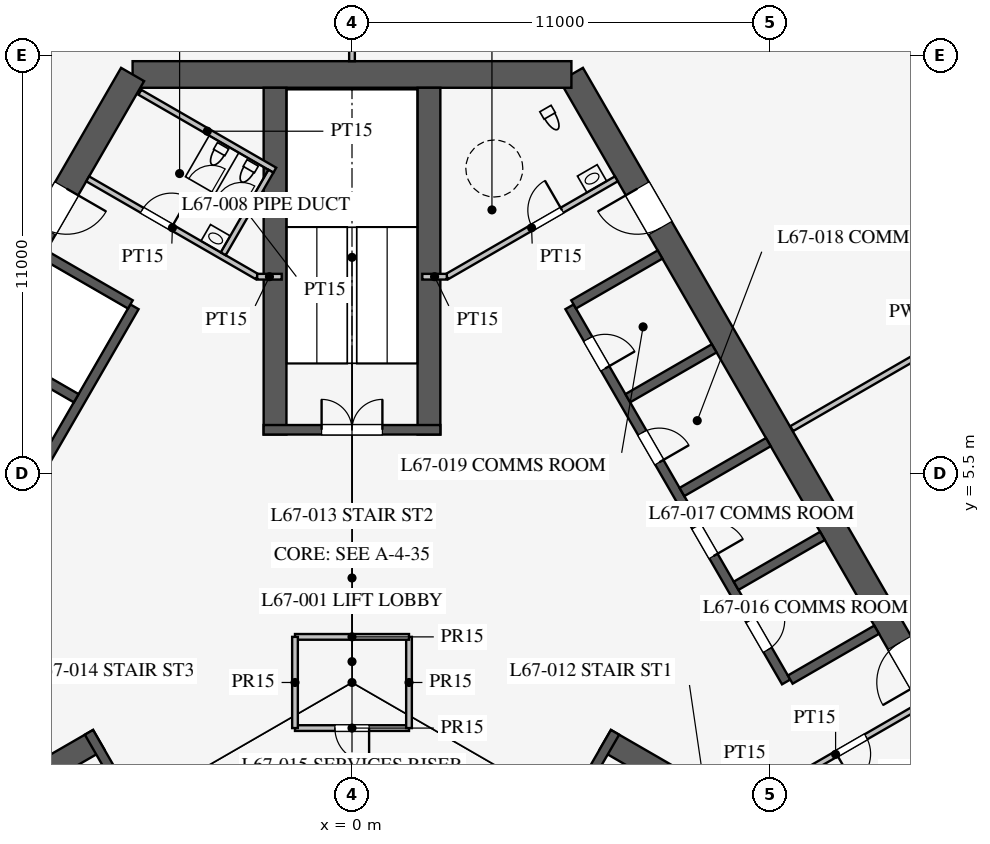
"""IFC4 building model, lengths in metres.
Left out: names, types, materials, properties, quantities, classifications, styles, units other than length and angle.
Written with IfcOpenShell. Run it as: python <this file> out.ifc"""

import sys

from ifc_helpers import new_model, si_unit, direction, frame, frame_2d, origin, place, context, subcontext, project, spatial, rectangle, extrude, element, fill, save


model = new_model("IFC4")
c1 = context("Model", 3, precision=1e-05, world=origin(), true_north=direction((0.0, 1.0)))
c2 = subcontext(c1, "Body", "Model", "MODEL_VIEW")
j1 = project(units=[si_unit("LENGTHUNIT", "METRE"), si_unit("PLANEANGLEUNIT", "RADIAN")], contexts=[c1])
p1 = place(None, origin())
s1 = spatial("IfcSite", under=j1, at=p1, CompositionType="ELEMENT")
p2 = place(p1, origin())
s2 = spatial("IfcBuilding", under=s1, at=p2, CompositionType="ELEMENT")
p3 = place(p2, frame((0.0, 0.0, 293.1)))
s3 = spatial("IfcBuildingStorey", under=s2, at=p3, CompositionType="ELEMENT", Elevation=293.1)
p4 = place(p3, frame((16.743, -3.0, 0.0), z_axis=(0.0, 0.0, 1.0), x_axis=(-0.500002442456, 0.866023993627, 0.0)))
e1 = element("IfcWall", 1, at=p4, inside=s3, PredefinedType="SHEAR", context=c2, shape_type="SweptSolid", body=[
    extrude(rectangle(XDim=21.939, YDim=0.7, at=frame_2d((10.97, 0.0))), origin(), (0.0, 0.0, 1.0), 4.2),
])
p5 = place(p4, frame((17.27, 0.0, 0.0)))
e2 = element("IfcOpeningElement", 2, at=p5, cuts=e1, PredefinedType="OPENING", context=c2, shape_type="SweptSolid", body=[
    extrude(rectangle(XDim=1.2, YDim=2.1, at=frame_2d((0.6, 1.05))), frame((0.0, 0.36, 0.0), z_axis=(0.0, -1.0, 0.0), x_axis=(1.0, 0.0, 0.0)), (0.0, 0.0, 1.0), 0.72),
])
p6 = place(p4, frame((3.47, 0.0, 0.0)))
e3 = element("IfcOpeningElement", 3, at=p6, cuts=e1, PredefinedType="OPENING", context=c2, shape_type="SweptSolid", body=[
    extrude(rectangle(XDim=1.2, YDim=2.1, at=frame_2d((0.6, 1.05))), frame((0.0, 0.36, 0.0), z_axis=(0.0, -1.0, 0.0), x_axis=(1.0, 0.0, 0.0)), (0.0, 0.0, 1.0), 0.72),
])
p7 = place(p3, frame((5.773, 16.0, 0.0), z_axis=(0.0, 0.0, 1.0), x_axis=(-1.0, 0.0, 0.0)))
e4 = element("IfcWall", 4, at=p7, inside=s3, PredefinedType="SHEAR", context=c2, shape_type="SweptSolid", body=[
    extrude(rectangle(XDim=11.547, YDim=0.7, at=frame_2d((5.773, 0.0))), origin(), (0.0, 0.0, 1.0), 4.2),
])
p8 = place(p3, frame((-5.773, 16.0, 0.0), z_axis=(0.0, 0.0, 1.0), x_axis=(-0.500002442456, -0.866023993627, 0.0)))
e5 = element("IfcWall", 5, at=p8, inside=s3, PredefinedType="SHEAR", context=c2, shape_type="SweptSolid", body=[
    extrude(rectangle(XDim=21.939, YDim=0.7, at=frame_2d((10.97, 0.0))), origin(), (0.0, 0.0, 1.0), 4.2),
])
p9 = place(p8, frame((17.27, 0.0, 0.0)))
e6 = element("IfcOpeningElement", 6, at=p9, cuts=e5, PredefinedType="OPENING", context=c2, shape_type="SweptSolid", body=[
    extrude(rectangle(XDim=1.2, YDim=2.1, at=frame_2d((0.6, 1.05))), frame((0.0, 0.36, 0.0), z_axis=(0.0, -1.0, 0.0), x_axis=(1.0, 0.0, 0.0)), (0.0, 0.0, 1.0), 0.72),
])
p10 = place(p8, frame((3.47, 0.0, 0.0)))
e7 = element("IfcOpeningElement", 7, at=p10, cuts=e5, PredefinedType="OPENING", context=c2, shape_type="SweptSolid", body=[
    extrude(rectangle(XDim=1.2, YDim=2.1, at=frame_2d((0.6, 1.05))), frame((0.0, 0.36, 0.0), z_axis=(0.0, -1.0, 0.0), x_axis=(1.0, 0.0, 0.0)), (0.0, 0.0, 1.0), 0.72),
])
p11 = place(p3, frame((11.424, 0.014, 0.0), z_axis=(0.0, 0.0, 1.0), x_axis=(-0.500001763848, 0.866024385424, 0.0)))
e8 = element("IfcWall", 8, at=p11, inside=s3, PredefinedType="SHEAR", context=c2, shape_type="SweptSolid", body=[
    extrude(rectangle(XDim=11.4, YDim=0.25, at=frame_2d((5.7, 0.0))), origin(), (0.0, 0.0, 1.0), 4.2),
])
p12 = place(p11, frame((0.975, 0.0, 0.0)))
e9 = element("IfcOpeningElement", 9, at=p12, cuts=e8, PredefinedType="OPENING", context=c2, shape_type="SweptSolid", body=[
    extrude(rectangle(XDim=0.9, YDim=2.1, at=frame_2d((0.45, 1.05))), frame((0.0, 0.135, 0.0), z_axis=(0.0, -1.0, 0.0), x_axis=(1.0, 0.0, 0.0)), (0.0, 0.0, 1.0), 0.27),
])
p13 = place(p11, frame((3.825, 0.0, 0.0)))
e10 = element("IfcOpeningElement", 10, at=p13, cuts=e8, PredefinedType="OPENING", context=c2, shape_type="SweptSolid", body=[
    extrude(rectangle(XDim=0.9, YDim=2.1, at=frame_2d((0.45, 1.05))), frame((0.0, 0.135, 0.0), z_axis=(0.0, -1.0, 0.0), x_axis=(1.0, 0.0, 0.0)), (0.0, 0.0, 1.0), 0.27),
])
p14 = place(p11, frame((6.675, 0.0, 0.0)))
e11 = element("IfcOpeningElement", 11, at=p14, cuts=e8, PredefinedType="OPENING", context=c2, shape_type="SweptSolid", body=[
    extrude(rectangle(XDim=0.9, YDim=2.1, at=frame_2d((0.45, 1.05))), frame((0.0, 0.135, 0.0), z_axis=(0.0, -1.0, 0.0), x_axis=(1.0, 0.0, 0.0)), (0.0, 0.0, 1.0), 0.27),
])
p15 = place(p11, frame((9.525, 0.0, 0.0)))
e12 = element("IfcOpeningElement", 12, at=p15, cuts=e8, PredefinedType="OPENING", context=c2, shape_type="SweptSolid", body=[
    extrude(rectangle(XDim=0.9, YDim=2.1, at=frame_2d((0.45, 1.05))), frame((0.0, 0.135, 0.0), z_axis=(0.0, -1.0, 0.0), x_axis=(1.0, 0.0, 0.0)), (0.0, 0.0, 1.0), 0.27),
])
for number, where, z_axis, x_axis in (
    (13, (11.532, 0.076, 0.0), (0.0, 0.0, 1.0), (0.866, 0.5, 0.0)),
    (14, (10.107, 2.544, 0.0), (0.0, 0.0, 1.0), (0.866, 0.5, 0.0)),
    (15, (8.682, 5.012, 0.0), (0.0, 0.0, 1.0), (0.866, 0.5, 0.0)),
    (16, (7.257, 7.481, 0.0), (0.0, 0.0, 1.0), (0.866, 0.5, 0.0)),
    (17, (5.832, 9.949, 0.0), (0.0, 0.0, 1.0), (0.866, 0.5, 0.0)),
):
    element("IfcWall", number, at=place(p3, frame(where, z_axis=z_axis, x_axis=x_axis)), inside=s3, PredefinedType="SHEAR", context=c2, shape_type="SweptSolid", body=[
        extrude(rectangle(XDim=2.625, YDim=0.25, at=frame_2d((1.312, 0.0))), origin(), (0.0, 0.0, 1.0), 4.2),
    ])
p16 = place(p3, frame((-5.724, 9.886, 0.0), z_axis=(0.0, 0.0, 1.0), x_axis=(-0.500001763848, -0.866024385424, 0.0)))
e18 = element("IfcWall", 18, at=p16, inside=s3, PredefinedType="SHEAR", context=c2, shape_type="SweptSolid", body=[
    extrude(rectangle(XDim=11.4, YDim=0.25, at=frame_2d((5.7, 0.0))), origin(), (0.0, 0.0, 1.0), 4.2),
])
p17 = place(p16, frame((6.525, 0.0, 0.0)))
e19 = element("IfcOpeningElement", 19, at=p17, cuts=e18, PredefinedType="OPENING", context=c2, shape_type="SweptSolid", body=[
    extrude(rectangle(XDim=1.2, YDim=2.2, at=frame_2d((0.6, 1.1))), frame((0.0, 0.135, 0.0), z_axis=(0.0, -1.0, 0.0), x_axis=(1.0, 0.0, 0.0)), (0.0, 0.0, 1.0), 0.27),
])
p18 = place(p16, frame((9.375, 0.0, 0.0)))
e20 = element("IfcOpeningElement", 20, at=p18, cuts=e18, PredefinedType="OPENING", context=c2, shape_type="SweptSolid", body=[
    extrude(rectangle(XDim=1.2, YDim=2.2, at=frame_2d((0.6, 1.1))), frame((0.0, 0.135, 0.0), z_axis=(0.0, -1.0, 0.0), x_axis=(1.0, 0.0, 0.0)), (0.0, 0.0, 1.0), 0.27),
])
for number, where, z_axis, x_axis in (
    (21, (-5.832, 9.949, 0.0), (0.0, 0.0, 1.0), (-0.866, 0.5, 0.0)),
    (22, (-7.257, 7.481, 0.0), (0.0, 0.0, 1.0), (-0.866, 0.5, 0.0)),
):
    element("IfcWall", number, at=place(p3, frame(where, z_axis=z_axis, x_axis=x_axis)), inside=s3, PredefinedType="SHEAR", context=c2, shape_type="SweptSolid", body=[
        extrude(rectangle(XDim=2.625, YDim=0.25, at=frame_2d((1.312, 0.0))), origin(), (0.0, 0.0, 1.0), 4.2),
    ])
p19 = place(p3, frame((6.663, -1.509, 0.0), z_axis=(0.0, 0.0, 1.0), x_axis=(0.866028310072, -0.499994966129, 0.0)))
e23 = element("IfcWall", 23, at=p19, inside=s3, PredefinedType="SHEAR", context=c2, shape_type="SweptSolid", body=[
    extrude(rectangle(XDim=9.125, YDim=0.6, at=frame_2d((4.562, 0.0))), origin(), (0.0, 0.0, 1.0), 4.2),
])
p20 = place(p3, frame((4.597, -5.339, 0.0), z_axis=(0.0, 0.0, 1.0), x_axis=(0.499984536904, 0.866034331223, 0.0)))
e24 = element("IfcWall", 24, at=p20, inside=s3, PredefinedType="SHEAR", context=c2, shape_type="SweptSolid", body=[
    extrude(rectangle(XDim=4.65, YDim=0.25, at=frame_2d((2.325, 0.0))), origin(), (0.0, 0.0, 1.0), 4.2),
])
p21 = place(p20, frame((1.525, 0.0, 0.0)))
e25 = element("IfcOpeningElement", 25, at=p21, cuts=e24, PredefinedType="OPENING", context=c2, shape_type="SweptSolid", body=[
    extrude(rectangle(XDim=1.6, YDim=2.1, at=frame_2d((0.8, 1.05))), frame((0.0, 0.135, 0.0), z_axis=(0.0, -1.0, 0.0), x_axis=(1.0, 0.0, 0.0)), (0.0, 0.0, 1.0), 0.27),
])
for number, where, z_axis, x_axis in (
    (26, (2.025, 6.525, 0.0), (0.0, 0.0, 1.0), (0.0, 1.0, 0.0)),
    (27, (-2.025, 6.525, 0.0), (0.0, 0.0, 1.0), (0.0, 1.0, 0.0)),
):
    element("IfcWall", number, at=place(p3, frame(where, z_axis=z_axis, x_axis=x_axis)), inside=s3, PredefinedType="SHEAR", context=c2, shape_type="SweptSolid", body=[
        extrude(rectangle(XDim=9.125, YDim=0.6, at=frame_2d((4.562, 0.0))), origin(), (0.0, 0.0, 1.0), 4.2),
    ])
p22 = place(p3, frame((2.325, 6.65, 0.0), z_axis=(0.0, 0.0, 1.0), x_axis=(-1.0, 0.0, 0.0)))
e28 = element("IfcWall", 28, at=p22, inside=s3, PredefinedType="SHEAR", context=c2, shape_type="SweptSolid", body=[
    extrude(rectangle(XDim=4.65, YDim=0.25, at=frame_2d((2.325, 0.0))), origin(), (0.0, 0.0, 1.0), 4.2),
])
p23 = place(p22, frame((1.525, 0.0, 0.0)))
e29 = element("IfcOpeningElement", 29, at=p23, cuts=e28, PredefinedType="OPENING", context=c2, shape_type="SweptSolid", body=[
    extrude(rectangle(XDim=1.6, YDim=2.1, at=frame_2d((0.8, 1.05))), frame((0.0, 0.135, 0.0), z_axis=(0.0, -1.0, 0.0), x_axis=(1.0, 0.0, 0.0)), (0.0, 0.0, 1.0), 0.27),
])
p24 = place(p3, frame((-6.663, -1.509, 0.0), z_axis=(0.0, 0.0, 1.0), x_axis=(-0.866028310072, -0.499994966129, 0.0)))
e30 = element("IfcWall", 30, at=p24, inside=s3, PredefinedType="SHEAR", context=c2, shape_type="SweptSolid", body=[
    extrude(rectangle(XDim=9.125, YDim=0.6, at=frame_2d((4.562, 0.0))), origin(), (0.0, 0.0, 1.0), 4.2),
])
p25 = place(p3, frame((-6.922, -1.312, 0.0), z_axis=(0.0, 0.0, 1.0), x_axis=(0.499984536904, -0.866034331223, 0.0)))
e31 = element("IfcWall", 31, at=p25, inside=s3, PredefinedType="SHEAR", context=c2, shape_type="SweptSolid", body=[
    extrude(rectangle(XDim=4.65, YDim=0.25, at=frame_2d((2.325, 0.0))), origin(), (0.0, 0.0, 1.0), 4.2),
])
p26 = place(p25, frame((1.525, 0.0, 0.0)))
e32 = element("IfcOpeningElement", 32, at=p26, cuts=e31, PredefinedType="OPENING", context=c2, shape_type="SweptSolid", body=[
    extrude(rectangle(XDim=1.6, YDim=2.1, at=frame_2d((0.8, 1.05))), frame((0.0, 0.135, 0.0), z_axis=(0.0, -1.0, 0.0), x_axis=(1.0, 0.0, 0.0)), (0.0, 0.0, 1.0), 0.27),
])
p27 = place(p3, frame((2.495, 10.678, 0.0), z_axis=(0.0, 0.0, 1.0), x_axis=(0.866037967349, 0.499978238636, 0.0)))
e33 = element("IfcWall", 33, at=p27, inside=s3, PredefinedType="PARTITIONING", context=c2, shape_type="SweptSolid", body=[
    extrude(rectangle(XDim=5.15, YDim=0.15, at=frame_2d((2.575, 0.0))), origin(), (0.0, 0.0, 1.0), 4.0),
])
p28 = place(p27, frame((2.6, 0.0, 0.0)))
e34 = element("IfcOpeningElement", 34, at=p28, cuts=e33, PredefinedType="OPENING", context=c2, shape_type="SweptSolid", body=[
    extrude(rectangle(XDim=0.9, YDim=2.1, at=frame_2d((0.45, 1.05))), frame((0.0, 0.085, 0.0), z_axis=(0.0, -1.0, 0.0), x_axis=(1.0, 0.0, 0.0)), (0.0, 0.0, 1.0), 0.17),
])
p29 = place(p3, frame((10.495, -3.178, 0.0), z_axis=(0.0, 0.0, 1.0), x_axis=(0.866037967349, 0.499978238636, 0.0)))
e35 = element("IfcWall", 35, at=p29, inside=s3, PredefinedType="PARTITIONING", context=c2, shape_type="SweptSolid", body=[
    extrude(rectangle(XDim=5.15, YDim=0.15, at=frame_2d((2.575, 0.0))), origin(), (0.0, 0.0, 1.0), 4.0),
])
p30 = place(p29, frame((2.6, 0.0, 0.0)))
e36 = element("IfcOpeningElement", 36, at=p30, cuts=e35, PredefinedType="OPENING", context=c2, shape_type="SweptSolid", body=[
    extrude(rectangle(XDim=0.9, YDim=2.1, at=frame_2d((0.45, 1.05))), frame((0.0, 0.085, 0.0), z_axis=(0.0, -1.0, 0.0), x_axis=(1.0, 0.0, 0.0)), (0.0, 0.0, 1.0), 0.17),
])
p31 = place(p3, frame((-2.495, 10.678, 0.0), z_axis=(0.0, 0.0, 1.0), x_axis=(-0.866037967349, 0.499978238636, 0.0)))
e37 = element("IfcWall", 37, at=p31, inside=s3, PredefinedType="PARTITIONING", context=c2, shape_type="SweptSolid", body=[
    extrude(rectangle(XDim=5.15, YDim=0.15, at=frame_2d((2.575, 0.0))), origin(), (0.0, 0.0, 1.0), 4.0),
])
p32 = place(p31, frame((2.6, 0.0, 0.0)))
e38 = element("IfcOpeningElement", 38, at=p32, cuts=e37, PredefinedType="OPENING", context=c2, shape_type="SweptSolid", body=[
    extrude(rectangle(XDim=0.9, YDim=2.1, at=frame_2d((0.45, 1.05))), frame((0.0, 0.085, 0.0), z_axis=(0.0, -1.0, 0.0), x_axis=(1.0, 0.0, 0.0)), (0.0, 0.0, 1.0), 0.17),
])
for number, where, z_axis, x_axis in (
    (39, (2.495, 10.678, 0.0), (0.0, 0.0, 1.0), (-1.0, 0.0, 0.0)),
    (40, (-2.495, 10.678, 0.0), (0.0, 0.0, 1.0), (1.0, 0.0, 0.0)),
):
    element("IfcWall", number, at=place(p3, frame(where, z_axis=z_axis, x_axis=x_axis)), inside=s3, PredefinedType="PARTITIONING", context=c2, shape_type="SweptSolid", body=[
        extrude(rectangle(XDim=0.645, YDim=0.15, at=frame_2d((0.323, 0.0))), origin(), (0.0, 0.0, 1.0), 4.0),
    ])
p33 = place(p3, frame((-2.031, 13.482, 0.0), z_axis=(0.0, 0.0, 1.0), x_axis=(-0.866050731258, 0.499956128963, 0.0)))
e41 = element("IfcWall", 41, at=p33, inside=s3, PredefinedType="PARTITIONING", context=c2, shape_type="SweptSolid", body=[
    extrude(rectangle(XDim=4.1, YDim=0.15, at=frame_2d((2.05, 0.0))), origin(), (0.0, 0.0, 1.0), 4.0),
])
p34 = place(p3, frame((-3.389, 11.281, 0.0), z_axis=(0.0, 0.0, 1.0), x_axis=(0.499989096993, 0.866031698547, 0.0)))
e42 = element("IfcWall", 42, at=p34, inside=s3, PredefinedType="PARTITIONING", context=c2, shape_type="SweptSolid", body=[
    extrude(rectangle(XDim=2.51, YDim=0.15, at=frame_2d((1.255, 0.0))), origin(), (0.0, 0.0, 1.0), 4.0),
])
p35 = place(p3, frame((-1.5, -1.2, 0.0), z_axis=(0.0, 0.0, 1.0), x_axis=(1.0, 0.0, 0.0)))
e43 = element("IfcWall", 43, at=p35, inside=s3, PredefinedType="PARTITIONING", context=c2, shape_type="SweptSolid", body=[
    extrude(rectangle(XDim=3.0, YDim=0.15, at=frame_2d((1.5, 0.0))), origin(), (0.0, 0.0, 1.0), 4.0),
])
p36 = place(p35, frame((1.05, 0.0, 0.0)))
e44 = element("IfcOpeningElement", 44, at=p36, cuts=e43, PredefinedType="OPENING", context=c2, shape_type="SweptSolid", body=[
    extrude(rectangle(XDim=0.9, YDim=2.1, at=frame_2d((0.45, 1.05))), frame((0.0, 0.085, 0.0), z_axis=(0.0, -1.0, 0.0), x_axis=(1.0, 0.0, 0.0)), (0.0, 0.0, 1.0), 0.17),
])
p37 = place(p3, frame((1.5, -1.2, 0.0), z_axis=(0.0, 0.0, 1.0), x_axis=(0.0, 1.0, 0.0)))
e45 = element("IfcWall", 45, at=p37, inside=s3, PredefinedType="PARTITIONING", context=c2, shape_type="SweptSolid", body=[
    extrude(rectangle(XDim=2.4, YDim=0.15, at=frame_2d((1.2, 0.0))), origin(), (0.0, 0.0, 1.0), 4.0),
])
p38 = place(p3, frame((1.5, 1.2, 0.0), z_axis=(0.0, 0.0, 1.0), x_axis=(-1.0, 0.0, 0.0)))
e46 = element("IfcWall", 46, at=p38, inside=s3, PredefinedType="PARTITIONING", context=c2, shape_type="SweptSolid", body=[
    extrude(rectangle(XDim=3.0, YDim=0.15, at=frame_2d((1.5, 0.0))), origin(), (0.0, 0.0, 1.0), 4.0),
])
p39 = place(p3, frame((-1.5, 1.2, 0.0), z_axis=(0.0, 0.0, 1.0), x_axis=(0.0, -1.0, 0.0)))
e47 = element("IfcWall", 47, at=p39, inside=s3, PredefinedType="PARTITIONING", context=c2, shape_type="SweptSolid", body=[
    extrude(rectangle(XDim=2.4, YDim=0.15, at=frame_2d((1.2, 0.0))), origin(), (0.0, 0.0, 1.0), 4.0),
])
p40 = place(p3, frame((0.0, 16.35, 0.0), z_axis=(0.0, 0.0, 1.0), x_axis=(0.0, 1.0, 0.0)))
e48 = element("IfcWall", 48, at=p40, inside=s3, PredefinedType="PARTITIONING", context=c2, shape_type="SweptSolid", body=[
    extrude(rectangle(XDim=13.4, YDim=0.15, at=frame_2d((6.7, 0.0))), origin(), (0.0, 0.0, 1.0), 2.5),
])
p41 = place(p3, frame((11.57, 6.68, 0.0), z_axis=(0.0, 0.0, 1.0), x_axis=(0.866026706704, 0.49999774327, 0.0)))
e49 = element("IfcWall", 49, at=p41, inside=s3, PredefinedType="PARTITIONING", context=c2, shape_type="SweptSolid", body=[
    extrude(rectangle(XDim=9.187, YDim=0.15, at=frame_2d((4.593, 0.0))), origin(), (0.0, 0.0, 1.0), 3.3),
])
p42 = place(p28, origin())
e50 = element("IfcDoor", 50, at=p42, inside=s3, OperationType="SINGLE_SWING_RIGHT", PredefinedType="DOOR", context=c2, shape_type="SweptSolid", body=[
    extrude(rectangle(XDim=0.9, YDim=2.1, at=frame_2d((0.45, 1.05))), frame((0.0, 0.025, 0.0), z_axis=(0.0, -1.0, 0.0), x_axis=(1.0, 0.0, 0.0)), (0.0, 0.0, 1.0), 0.05),
])
fill(e34, e50)
p43 = place(p30, frame((0.9, 0.0, 0.0), z_axis=(0.0, 0.0, 1.0), x_axis=(-1.0, 0.0, 0.0)))
e51 = element("IfcDoor", 51, at=p43, inside=s3, OperationType="SINGLE_SWING_RIGHT", PredefinedType="DOOR", context=c2, shape_type="SweptSolid", body=[
    extrude(rectangle(XDim=0.9, YDim=2.1, at=frame_2d((0.45, 1.05))), frame((0.0, 0.025, 0.0), z_axis=(0.0, -1.0, 0.0), x_axis=(1.0, 0.0, 0.0)), (0.0, 0.0, 1.0), 0.05),
])
fill(e36, e51)
p44 = place(p32, frame((0.9, 0.0, 0.0), z_axis=(0.0, 0.0, 1.0), x_axis=(-1.0, 0.0, 0.0)))
e52 = element("IfcDoor", 52, at=p44, inside=s3, OperationType="SINGLE_SWING_RIGHT", PredefinedType="DOOR", context=c2, shape_type="SweptSolid", body=[
    extrude(rectangle(XDim=0.9, YDim=2.1, at=frame_2d((0.45, 1.05))), frame((0.0, 0.025, 0.0), z_axis=(0.0, -1.0, 0.0), x_axis=(1.0, 0.0, 0.0)), (0.0, 0.0, 1.0), 0.05),
])
fill(e38, e52)
p45 = place(p36, frame((0.9, 0.0, 0.0), z_axis=(0.0, 0.0, 1.0), x_axis=(-1.0, 0.0, 0.0)))
e53 = element("IfcDoor", 53, at=p45, inside=s3, OperationType="SINGLE_SWING_LEFT", PredefinedType="DOOR", context=c2, shape_type="SweptSolid", body=[
    extrude(rectangle(XDim=0.9, YDim=2.1, at=frame_2d((0.45, 1.05))), frame((0.0, 0.025, 0.0), z_axis=(0.0, -1.0, 0.0), x_axis=(1.0, 0.0, 0.0)), (0.0, 0.0, 1.0), 0.05),
])
fill(e44, e53)
p46 = place(p23, frame((1.6, 0.0, 0.0), z_axis=(0.0, 0.0, 1.0), x_axis=(-1.0, 0.0, 0.0)))
e54 = element("IfcDoor", 54, at=p46, inside=s3, OperationType="DOUBLE_DOOR_SINGLE_SWING", PredefinedType="DOOR", context=c2, shape_type="SweptSolid", body=[
    extrude(rectangle(XDim=1.6, YDim=2.1, at=frame_2d((0.8, 1.05))), frame((0.0, 0.025, 0.0), z_axis=(0.0, -1.0, 0.0), x_axis=(1.0, 0.0, 0.0)), (0.0, 0.0, 1.0), 0.05),
])
fill(e29, e54)
p47 = place(p5, origin())
e55 = element("IfcDoor", 55, at=p47, inside=s3, OperationType="SINGLE_SWING_RIGHT", PredefinedType="DOOR", context=c2, shape_type="SweptSolid", body=[
    extrude(rectangle(XDim=1.2, YDim=2.1, at=frame_2d((0.6, 1.05))), frame((0.0, 0.025, 0.0), z_axis=(0.0, -1.0, 0.0), x_axis=(1.0, 0.0, 0.0)), (0.0, 0.0, 1.0), 0.05),
])
fill(e2, e55)
p48 = place(p6, origin())
e56 = element("IfcDoor", 56, at=p48, inside=s3, OperationType="SINGLE_SWING_LEFT", PredefinedType="DOOR", context=c2, shape_type="SweptSolid", body=[
    extrude(rectangle(XDim=1.2, YDim=2.1, at=frame_2d((0.6, 1.05))), frame((0.0, 0.025, 0.0), z_axis=(0.0, -1.0, 0.0), x_axis=(1.0, 0.0, 0.0)), (0.0, 0.0, 1.0), 0.05),
])
fill(e3, e56)
p49 = place(p10, origin())
e57 = element("IfcDoor", 57, at=p49, inside=s3, OperationType="SINGLE_SWING_LEFT", PredefinedType="DOOR", context=c2, shape_type="SweptSolid", body=[
    extrude(rectangle(XDim=1.2, YDim=2.1, at=frame_2d((0.6, 1.05))), frame((0.0, 0.025, 0.0), z_axis=(0.0, -1.0, 0.0), x_axis=(1.0, 0.0, 0.0)), (0.0, 0.0, 1.0), 0.05),
])
fill(e7, e57)
p50 = place(p12, frame((0.9, 0.0, 0.0), z_axis=(0.0, 0.0, 1.0), x_axis=(-1.0, 0.0, 0.0)))
e58 = element("IfcDoor", 58, at=p50, inside=s3, OperationType="SINGLE_SWING_LEFT", PredefinedType="DOOR", context=c2, shape_type="SweptSolid", body=[
    extrude(rectangle(XDim=0.9, YDim=2.1, at=frame_2d((0.45, 1.05))), frame((0.0, 0.025, 0.0), z_axis=(0.0, -1.0, 0.0), x_axis=(1.0, 0.0, 0.0)), (0.0, 0.0, 1.0), 0.05),
])
fill(e9, e58)
p51 = place(p13, frame((0.9, 0.0, 0.0), z_axis=(0.0, 0.0, 1.0), x_axis=(-1.0, 0.0, 0.0)))
e59 = element("IfcDoor", 59, at=p51, inside=s3, OperationType="SINGLE_SWING_RIGHT", PredefinedType="DOOR", context=c2, shape_type="SweptSolid", body=[
    extrude(rectangle(XDim=0.9, YDim=2.1, at=frame_2d((0.45, 1.05))), frame((0.0, 0.025, 0.0), z_axis=(0.0, -1.0, 0.0), x_axis=(1.0, 0.0, 0.0)), (0.0, 0.0, 1.0), 0.05),
])
fill(e10, e59)
p52 = place(p14, frame((0.9, 0.0, 0.0), z_axis=(0.0, 0.0, 1.0), x_axis=(-1.0, 0.0, 0.0)))
e60 = element("IfcDoor", 60, at=p52, inside=s3, OperationType="SINGLE_SWING_RIGHT", PredefinedType="DOOR", context=c2, shape_type="SweptSolid", body=[
    extrude(rectangle(XDim=0.9, YDim=2.1, at=frame_2d((0.45, 1.05))), frame((0.0, 0.025, 0.0), z_axis=(0.0, -1.0, 0.0), x_axis=(1.0, 0.0, 0.0)), (0.0, 0.0, 1.0), 0.05),
])
fill(e11, e60)
p53 = place(p15, frame((0.9, 0.0, 0.0), z_axis=(0.0, 0.0, 1.0), x_axis=(-1.0, 0.0, 0.0)))
e61 = element("IfcDoor", 61, at=p53, inside=s3, OperationType="SINGLE_SWING_RIGHT", PredefinedType="DOOR", context=c2, shape_type="SweptSolid", body=[
    extrude(rectangle(XDim=0.9, YDim=2.1, at=frame_2d((0.45, 1.05))), frame((0.0, 0.025, 0.0), z_axis=(0.0, -1.0, 0.0), x_axis=(1.0, 0.0, 0.0)), (0.0, 0.0, 1.0), 0.05),
])
fill(e12, e61)
save(model, sys.argv[1])
